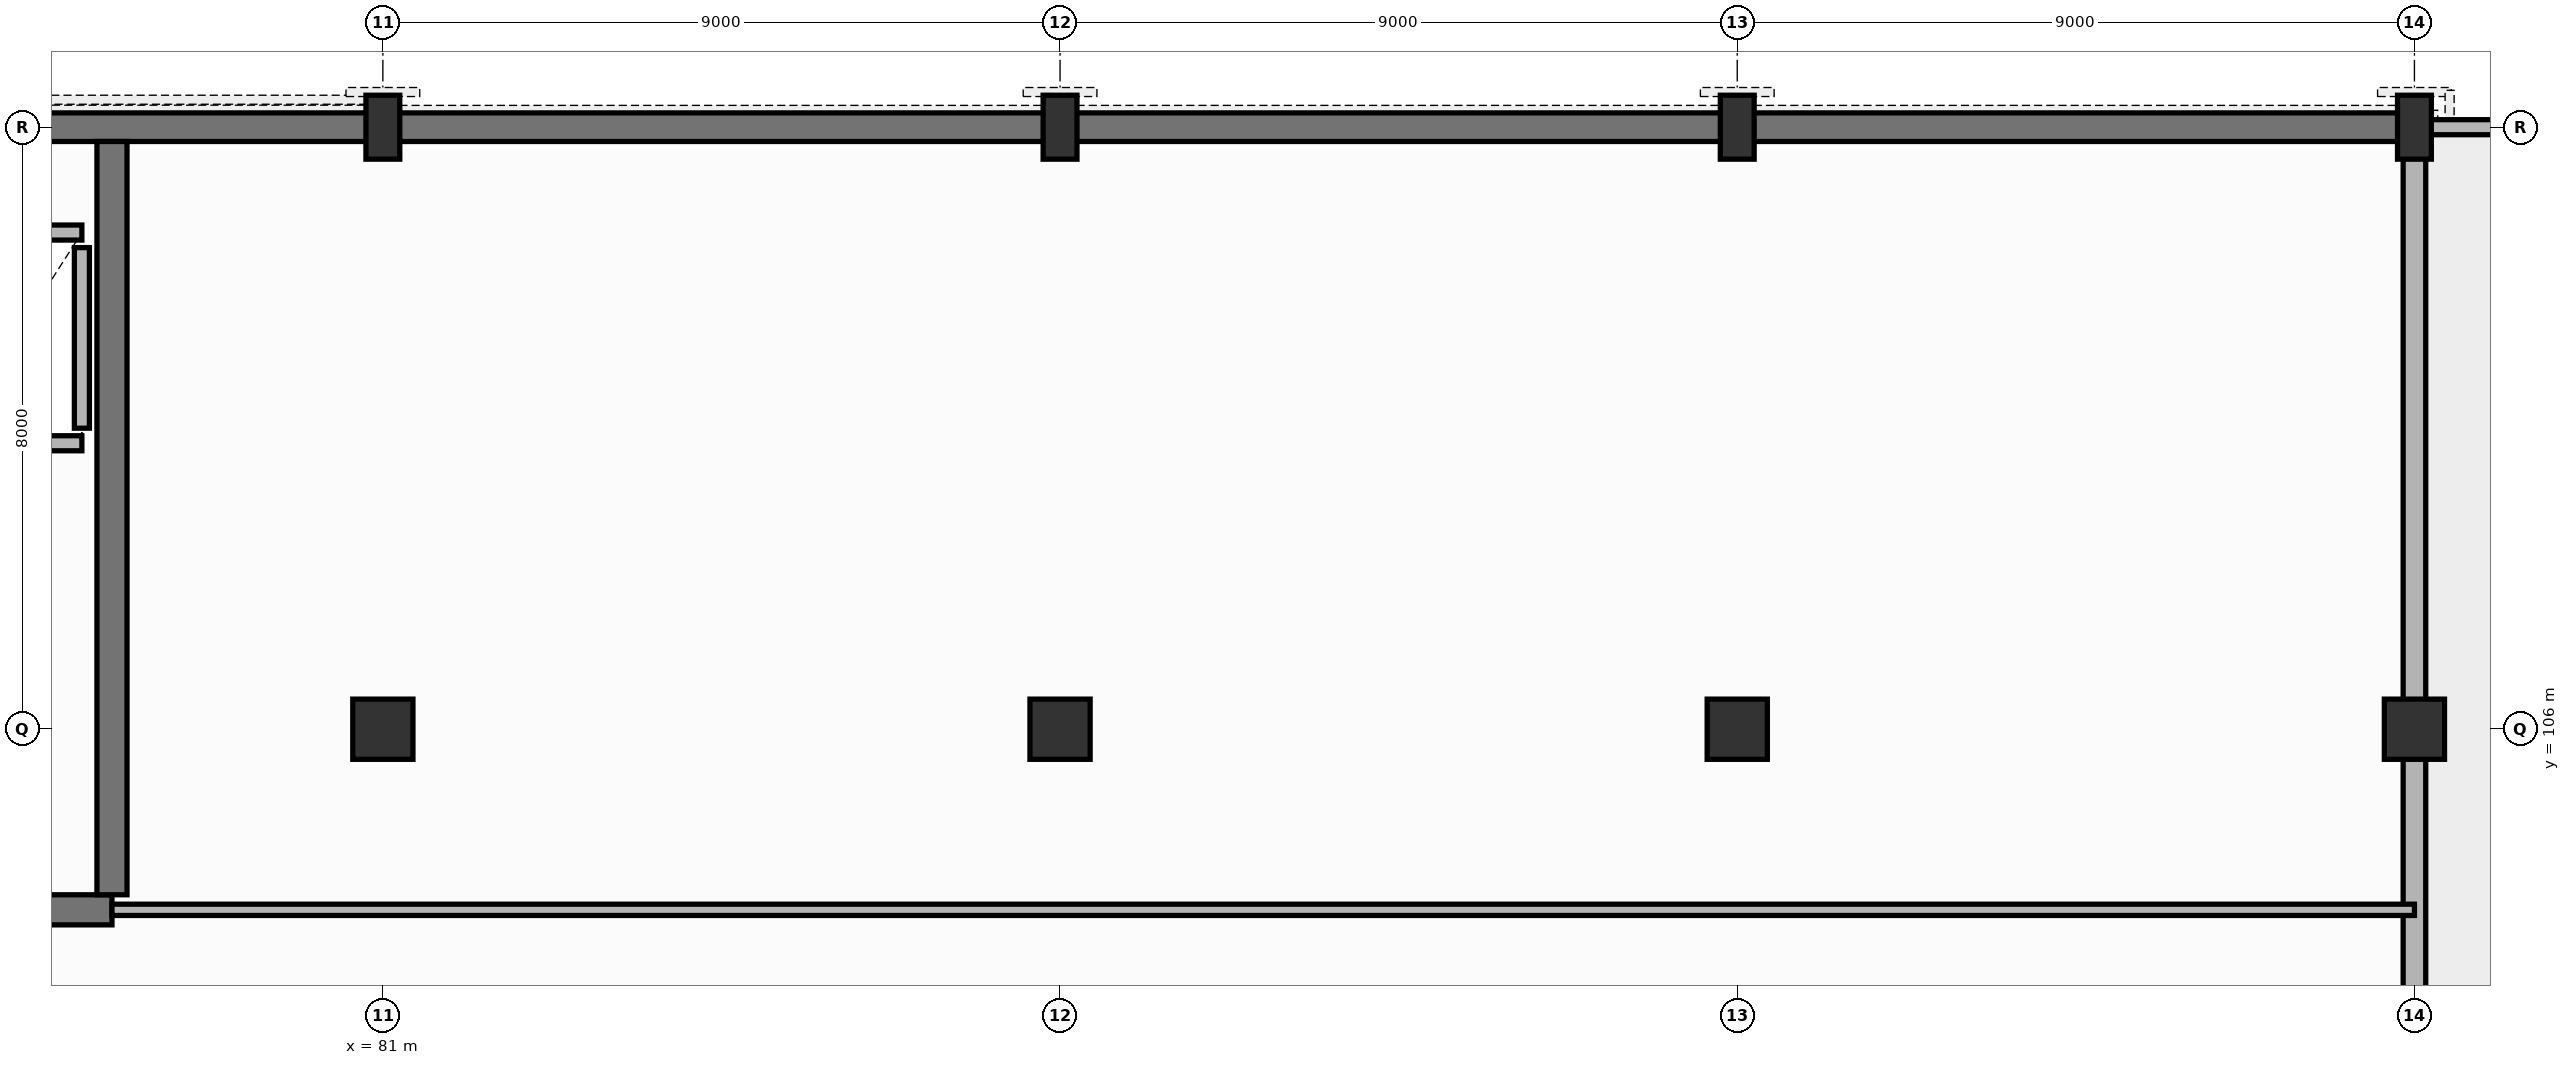
"""IFC4 building model, lengths in metres.
Left out: names, types, materials, properties, quantities, classifications, styles, units other than length and angle.
Written with IfcOpenShell. Run it as: python <this file> out.ifc"""

import sys

from ifc_helpers import new_model, si_unit, direction, frame, frame_2d, origin, origin_2d, place, context, subcontext, project, spatial, rectangle, extrude, element, fill, save


model = new_model("IFC4")
c1 = context("Model", 3, precision=1e-05, world=origin(), true_north=direction((0.0, 1.0)))
c2 = subcontext(c1, "Body", "Model", "MODEL_VIEW")
j1 = project(units=[si_unit("LENGTHUNIT", "METRE"), si_unit("PLANEANGLEUNIT", "RADIAN")], contexts=[c1])
p1 = place(None, origin())
s1 = spatial("IfcSite", under=j1, at=p1, CompositionType="ELEMENT")
p2 = place(p1, origin())
s2 = spatial("IfcBuilding", under=s1, at=p2, CompositionType="ELEMENT")
p3 = place(p2, frame((0.0, 0.0, 5.1)))
s3 = spatial("IfcBuildingStorey", under=s2, at=p3, CompositionType="ELEMENT", Elevation=5.1)
p4 = place(p3, frame((81.0, 106.0, 0.0), z_axis=(0.0, 0.0, 1.0), x_axis=(1.0, 0.0, 0.0)))
e1 = element("IfcColumn", 1, at=p4, inside=s3, PredefinedType="COLUMN", context=c2, shape_type="SweptSolid", body=[
    extrude(rectangle(XDim=0.8, YDim=0.8, at=origin_2d()), origin(), (0.0, 0.0, 1.0), 3.84),
])
p5 = place(p3, frame((81.0, 114.0, 0.0), z_axis=(0.0, 0.0, 1.0), x_axis=(0.0, 1.0, 0.0)))
e2 = element("IfcColumn", 2, at=p5, inside=s3, PredefinedType="COLUMN", context=c2, shape_type="SweptSolid", body=[
    extrude(rectangle(XDim=0.45, YDim=0.85, at=origin_2d()), origin(), (0.0, 0.0, 1.0), 3.84),
])
p6 = place(p3, frame((90.0, 106.0, 0.0), z_axis=(0.0, 0.0, 1.0), x_axis=(1.0, 0.0, 0.0)))
e3 = element("IfcColumn", 3, at=p6, inside=s3, PredefinedType="COLUMN", context=c2, shape_type="SweptSolid", body=[
    extrude(rectangle(XDim=0.8, YDim=0.8, at=origin_2d()), origin(), (0.0, 0.0, 1.0), 3.84),
])
p7 = place(p3, frame((90.0, 114.0, 0.0), z_axis=(0.0, 0.0, 1.0), x_axis=(0.0, 1.0, 0.0)))
e4 = element("IfcColumn", 4, at=p7, inside=s3, PredefinedType="COLUMN", context=c2, shape_type="SweptSolid", body=[
    extrude(rectangle(XDim=0.45, YDim=0.85, at=origin_2d()), origin(), (0.0, 0.0, 1.0), 3.84),
])
p8 = place(p3, frame((99.0, 106.0, 0.0), z_axis=(0.0, 0.0, 1.0), x_axis=(1.0, 0.0, 0.0)))
e5 = element("IfcColumn", 5, at=p8, inside=s3, PredefinedType="COLUMN", context=c2, shape_type="SweptSolid", body=[
    extrude(rectangle(XDim=0.8, YDim=0.8, at=origin_2d()), origin(), (0.0, 0.0, 1.0), 3.84),
])
p9 = place(p3, frame((99.0, 114.0, 0.0), z_axis=(0.0, 0.0, 1.0), x_axis=(0.0, 1.0, 0.0)))
e6 = element("IfcColumn", 6, at=p9, inside=s3, PredefinedType="COLUMN", context=c2, shape_type="SweptSolid", body=[
    extrude(rectangle(XDim=0.45, YDim=0.85, at=origin_2d()), origin(), (0.0, 0.0, 1.0), 3.84),
])
p10 = place(p3, frame((108.0, 106.0, 0.0), z_axis=(0.0, 0.0, 1.0), x_axis=(1.0, 0.0, 0.0)))
e7 = element("IfcColumn", 7, at=p10, inside=s3, PredefinedType="COLUMN", context=c2, shape_type="SweptSolid", body=[
    extrude(rectangle(XDim=0.8, YDim=0.8, at=origin_2d()), origin(), (0.0, 0.0, 1.0), 3.84),
])
p11 = place(p3, frame((108.0, 114.0, 0.0), z_axis=(0.0, 0.0, 1.0), x_axis=(0.0, 1.0, 0.0)))
e8 = element("IfcColumn", 8, at=p11, inside=s3, PredefinedType="COLUMN", context=c2, shape_type="SweptSolid", body=[
    extrude(rectangle(XDim=0.45, YDim=0.85, at=origin_2d()), origin(), (0.0, 0.0, 1.0), 3.84),
])
p12 = place(p3, frame((72.0, 114.0, 0.0), z_axis=(0.0, 0.0, 1.0), x_axis=(1.0, 0.0, 0.0)))
e9 = element("IfcWall", 9, at=p12, inside=s3, PredefinedType="SOLIDWALL", context=c2, shape_type="SweptSolid", body=[
    extrude(rectangle(XDim=9.0, YDim=0.38, at=frame_2d((4.5, 0.0))), origin(), (0.0, 0.0, 1.0), 3.55),
])
p13 = place(p3, frame((81.0, 114.0, 0.0), z_axis=(0.0, 0.0, 1.0), x_axis=(1.0, 0.0, 0.0)))
e10 = element("IfcWall", 10, at=p13, inside=s3, PredefinedType="SOLIDWALL", context=c2, shape_type="SweptSolid", body=[
    extrude(rectangle(XDim=9.0, YDim=0.38, at=frame_2d((4.5, 0.0))), origin(), (0.0, 0.0, 1.0), 3.55),
])
p14 = place(p13, frame((2.2, 0.0, 0.615)))
e11 = element("IfcOpeningElement", 11, at=p14, cuts=e10, PredefinedType="OPENING", context=c2, shape_type="SweptSolid", body=[
    extrude(rectangle(XDim=0.75, YDim=2.2, at=frame_2d((0.375, 1.1))), frame((0.0, 0.2, 0.0), z_axis=(0.0, -1.0, 0.0), x_axis=(1.0, 0.0, 0.0)), (0.0, 0.0, 1.0), 0.4),
])
p15 = place(p13, frame((5.4, 0.0, 0.615)))
e12 = element("IfcOpeningElement", 12, at=p15, cuts=e10, PredefinedType="OPENING", context=c2, shape_type="SweptSolid", body=[
    extrude(rectangle(XDim=0.9, YDim=2.2, at=frame_2d((0.45, 1.1))), frame((0.0, 0.2, 0.0), z_axis=(0.0, -1.0, 0.0), x_axis=(1.0, 0.0, 0.0)), (0.0, 0.0, 1.0), 0.4),
])
p16 = place(p3, frame((90.0, 114.0, 0.0), z_axis=(0.0, 0.0, 1.0), x_axis=(1.0, 0.0, 0.0)))
e13 = element("IfcWall", 13, at=p16, inside=s3, PredefinedType="SOLIDWALL", context=c2, shape_type="SweptSolid", body=[
    extrude(rectangle(XDim=9.0, YDim=0.38, at=frame_2d((4.5, 0.0))), origin(), (0.0, 0.0, 1.0), 3.55),
])
p17 = place(p16, frame((2.2, 0.0, 0.615)))
e14 = element("IfcOpeningElement", 14, at=p17, cuts=e13, PredefinedType="OPENING", context=c2, shape_type="SweptSolid", body=[
    extrude(rectangle(XDim=0.75, YDim=2.2, at=frame_2d((0.375, 1.1))), frame((0.0, 0.2, 0.0), z_axis=(0.0, -1.0, 0.0), x_axis=(1.0, 0.0, 0.0)), (0.0, 0.0, 1.0), 0.4),
])
p18 = place(p16, frame((5.4, 0.0, 0.615)))
e15 = element("IfcOpeningElement", 15, at=p18, cuts=e13, PredefinedType="OPENING", context=c2, shape_type="SweptSolid", body=[
    extrude(rectangle(XDim=0.9, YDim=2.2, at=frame_2d((0.45, 1.1))), frame((0.0, 0.2, 0.0), z_axis=(0.0, -1.0, 0.0), x_axis=(1.0, 0.0, 0.0)), (0.0, 0.0, 1.0), 0.4),
])
p19 = place(p3, frame((99.0, 114.0, 0.0), z_axis=(0.0, 0.0, 1.0), x_axis=(1.0, 0.0, 0.0)))
e16 = element("IfcWall", 16, at=p19, inside=s3, PredefinedType="SOLIDWALL", context=c2, shape_type="SweptSolid", body=[
    extrude(rectangle(XDim=9.0, YDim=0.38, at=frame_2d((4.5, 0.0))), origin(), (0.0, 0.0, 1.0), 3.55),
])
p20 = place(p19, frame((2.2, 0.0, 0.575)))
e17 = element("IfcOpeningElement", 17, at=p20, cuts=e16, PredefinedType="OPENING", context=c2, shape_type="SweptSolid", body=[
    extrude(rectangle(XDim=0.75, YDim=2.2, at=frame_2d((0.375, 1.1))), frame((0.0, 0.2, 0.0), z_axis=(0.0, -1.0, 0.0), x_axis=(1.0, 0.0, 0.0)), (0.0, 0.0, 1.0), 0.4),
])
p21 = place(p19, frame((5.4, 0.0, 0.575)))
e18 = element("IfcOpeningElement", 18, at=p21, cuts=e16, PredefinedType="OPENING", context=c2, shape_type="SweptSolid", body=[
    extrude(rectangle(XDim=0.9, YDim=2.2, at=frame_2d((0.45, 1.1))), frame((0.0, 0.2, 0.0), z_axis=(0.0, -1.0, 0.0), x_axis=(1.0, 0.0, 0.0)), (0.0, 0.0, 1.0), 0.4),
])
p22 = place(p3, frame((108.0, 82.2, 0.0), z_axis=(0.0, 0.0, 1.0), x_axis=(0.0, 1.0, 0.0)))
e19 = element("IfcWall", 19, at=p22, inside=s3, PredefinedType="SOLIDWALL", context=c2, shape_type="SweptSolid", body=[
    extrude(rectangle(XDim=31.8, YDim=0.3, at=frame_2d((15.9, 0.0))), origin(), (0.0, 0.0, 1.0), 2.815),
])
p23 = place(p22, frame((3.2, 0.0, 0.595)))
e20 = element("IfcOpeningElement", 20, at=p23, cuts=e19, PredefinedType="OPENING", context=c2, shape_type="SweptSolid", body=[
    extrude(rectangle(XDim=1.5, YDim=2.1, at=frame_2d((0.75, 1.05))), frame((0.0, 0.16, 0.0), z_axis=(0.0, -1.0, 0.0), x_axis=(1.0, 0.0, 0.0)), (0.0, 0.0, 1.0), 0.32),
])
p24 = place(p22, frame((10.5, 0.0, 0.845)))
e21 = element("IfcOpeningElement", 21, at=p24, cuts=e19, PredefinedType="OPENING", context=c2, shape_type="SweptSolid", body=[
    extrude(rectangle(XDim=1.35, YDim=1.85, at=frame_2d((0.675, 0.925))), frame((0.0, 0.16, 0.0), z_axis=(0.0, -1.0, 0.0), x_axis=(1.0, 0.0, 0.0)), (0.0, 0.0, 1.0), 0.32),
])
p25 = place(p3, frame((145.8, 114.0, 0.0), z_axis=(0.0, 0.0, 1.0), x_axis=(-1.0, 0.0, 0.0)))
e22 = element("IfcWall", 22, at=p25, inside=s3, PredefinedType="PARAPET", context=c2, shape_type="SweptSolid", body=[
    extrude(rectangle(XDim=37.6, YDim=0.2, at=frame_2d((18.8, 0.0))), origin(), (0.0, 0.0, 1.0), 0.72),
])
p26 = place(p3, frame((64.2, 103.6, 0.0), z_axis=(0.0, 0.0, 1.0), x_axis=(1.0, 0.0, 0.0)))
e23 = element("IfcWall", 23, at=p26, inside=s3, PredefinedType="SHEAR", context=c2, shape_type="SweptSolid", body=[
    extrude(rectangle(XDim=13.2, YDim=0.4, at=frame_2d((6.6, 0.0))), origin(), (0.0, 0.0, 1.0), 3.55),
])
p27 = place(p26, frame((5.8, 0.0, 0.0)))
e24 = element("IfcOpeningElement", 24, at=p27, cuts=e23, PredefinedType="OPENING", context=c2, shape_type="SweptSolid", body=[
    extrude(rectangle(XDim=1.5, YDim=2.2, at=frame_2d((0.75, 1.1))), frame((0.0, 0.21, 0.0), z_axis=(0.0, -1.0, 0.0), x_axis=(1.0, 0.0, 0.0)), (0.0, 0.0, 1.0), 0.42),
])
p28 = place(p3, frame((77.4, 103.8, 0.0), z_axis=(0.0, 0.0, 1.0), x_axis=(0.0, 1.0, 0.0)))
e25 = element("IfcWall", 25, at=p28, inside=s3, PredefinedType="SHEAR", context=c2, shape_type="SweptSolid", body=[
    extrude(rectangle(XDim=10.01, YDim=0.4, at=frame_2d((5.005, 0.0))), origin(), (0.0, 0.0, 1.0), 3.55),
])
p29 = place(p3, frame((75.2, 109.8, 0.0), z_axis=(0.0, 0.0, 1.0), x_axis=(1.0, 0.0, 0.0)))
e26 = element("IfcWall", 26, at=p29, inside=s3, PredefinedType="PARTITIONING", context=c2, shape_type="SweptSolid", body=[
    extrude(rectangle(XDim=1.8, YDim=0.2, at=frame_2d((0.9, 0.0))), origin(), (0.0, 0.0, 1.0), 3.55),
])
p30 = place(p29, frame((0.45, 0.0, 0.0)))
e27 = element("IfcOpeningElement", 27, at=p30, cuts=e26, PredefinedType="OPENING", context=c2, shape_type="SweptSolid", body=[
    extrude(rectangle(XDim=0.9, YDim=2.1, at=frame_2d((0.45, 1.05))), frame((0.0, 0.11, 0.0), z_axis=(0.0, -1.0, 0.0), x_axis=(1.0, 0.0, 0.0)), (0.0, 0.0, 1.0), 0.22),
])
p31 = place(p3, frame((75.2, 112.6, 0.0), z_axis=(0.0, 0.0, 1.0), x_axis=(1.0, 0.0, 0.0)))
e28 = element("IfcWall", 28, at=p31, inside=s3, PredefinedType="PARTITIONING", context=c2, shape_type="SweptSolid", body=[
    extrude(rectangle(XDim=1.8, YDim=0.2, at=frame_2d((0.9, 0.0))), origin(), (0.0, 0.0, 1.0), 3.55),
])
p32 = place(p3, frame((77.0, 110.0, 0.0), z_axis=(0.0, 0.0, 1.0), x_axis=(0.0, 1.0, 0.0)))
e29 = element("IfcWall", 29, at=p32, inside=s3, PredefinedType="PARTITIONING", context=c2, shape_type="SweptSolid", body=[
    extrude(rectangle(XDim=2.4, YDim=0.2, at=frame_2d((1.2, 0.0))), origin(), (0.0, 0.0, 1.0), 3.55),
])
p33 = place(p3, frame((77.4, 103.6, 0.0), z_axis=(0.0, 0.0, 1.0), x_axis=(1.0, 0.0, 0.0)))
e30 = element("IfcWall", 30, at=p33, inside=s3, PredefinedType="PARTITIONING", context=c2, shape_type="SweptSolid", body=[
    extrude(rectangle(XDim=30.6, YDim=0.15, at=frame_2d((15.3, 0.0))), origin(), (0.0, 0.0, 1.0), 3.55),
])
p34 = place(p33, frame((14.6, 0.0, 0.0)))
e31 = element("IfcOpeningElement", 31, at=p34, cuts=e30, PredefinedType="OPENING", context=c2, shape_type="SweptSolid", body=[
    extrude(rectangle(XDim=1.0, YDim=2.15, at=frame_2d((0.5, 1.075))), frame((0.0, 0.085, 0.0), z_axis=(0.0, -1.0, 0.0), x_axis=(1.0, 0.0, 0.0)), (0.0, 0.0, 1.0), 0.17),
])
p35 = place(p14, origin())
e32 = element("IfcWindow", 32, at=p35, inside=s3, PartitioningType="SINGLE_PANEL", PredefinedType="WINDOW", context=c2, shape_type="SweptSolid", body=[
    extrude(rectangle(XDim=0.75, YDim=2.2, at=frame_2d((0.375, 1.1))), frame((0.0, 0.03, 0.0), z_axis=(0.0, -1.0, 0.0), x_axis=(1.0, 0.0, 0.0)), (0.0, 0.0, 1.0), 0.06),
])
fill(e11, e32)
p36 = place(p15, origin())
e33 = element("IfcWindow", 33, at=p36, inside=s3, PartitioningType="SINGLE_PANEL", PredefinedType="WINDOW", context=c2, shape_type="SweptSolid", body=[
    extrude(rectangle(XDim=0.9, YDim=2.2, at=frame_2d((0.45, 1.1))), frame((0.0, 0.03, 0.0), z_axis=(0.0, -1.0, 0.0), x_axis=(1.0, 0.0, 0.0)), (0.0, 0.0, 1.0), 0.06),
])
fill(e12, e33)
p37 = place(p17, origin())
e34 = element("IfcWindow", 34, at=p37, inside=s3, PartitioningType="SINGLE_PANEL", PredefinedType="WINDOW", context=c2, shape_type="SweptSolid", body=[
    extrude(rectangle(XDim=0.75, YDim=2.2, at=frame_2d((0.375, 1.1))), frame((0.0, 0.03, 0.0), z_axis=(0.0, -1.0, 0.0), x_axis=(1.0, 0.0, 0.0)), (0.0, 0.0, 1.0), 0.06),
])
fill(e14, e34)
p38 = place(p18, origin())
e35 = element("IfcWindow", 35, at=p38, inside=s3, PartitioningType="SINGLE_PANEL", PredefinedType="WINDOW", context=c2, shape_type="SweptSolid", body=[
    extrude(rectangle(XDim=0.9, YDim=2.2, at=frame_2d((0.45, 1.1))), frame((0.0, 0.03, 0.0), z_axis=(0.0, -1.0, 0.0), x_axis=(1.0, 0.0, 0.0)), (0.0, 0.0, 1.0), 0.06),
])
fill(e15, e35)
p39 = place(p20, origin())
e36 = element("IfcWindow", 36, at=p39, inside=s3, PartitioningType="SINGLE_PANEL", PredefinedType="WINDOW", context=c2, shape_type="SweptSolid", body=[
    extrude(rectangle(XDim=0.75, YDim=2.2, at=frame_2d((0.375, 1.1))), frame((0.0, 0.03, 0.0), z_axis=(0.0, -1.0, 0.0), x_axis=(1.0, 0.0, 0.0)), (0.0, 0.0, 1.0), 0.06),
])
fill(e17, e36)
p40 = place(p21, origin())
e37 = element("IfcWindow", 37, at=p40, inside=s3, PartitioningType="SINGLE_PANEL", PredefinedType="WINDOW", context=c2, shape_type="SweptSolid", body=[
    extrude(rectangle(XDim=0.9, YDim=2.2, at=frame_2d((0.45, 1.1))), frame((0.0, 0.03, 0.0), z_axis=(0.0, -1.0, 0.0), x_axis=(1.0, 0.0, 0.0)), (0.0, 0.0, 1.0), 0.06),
])
fill(e18, e37)
p41 = place(p34, origin())
e38 = element("IfcDoor", 38, at=p41, inside=s3, OperationType="SINGLE_SWING_RIGHT", PredefinedType="DOOR", context=c2, shape_type="SweptSolid", body=[
    extrude(rectangle(XDim=1.0, YDim=2.15, at=frame_2d((0.5, 1.075))), frame((0.0, 0.025, 0.0), z_axis=(0.0, -1.0, 0.0), x_axis=(1.0, 0.0, 0.0)), (0.0, 0.0, 1.0), 0.05),
])
fill(e31, e38)
save(model, sys.argv[1])
